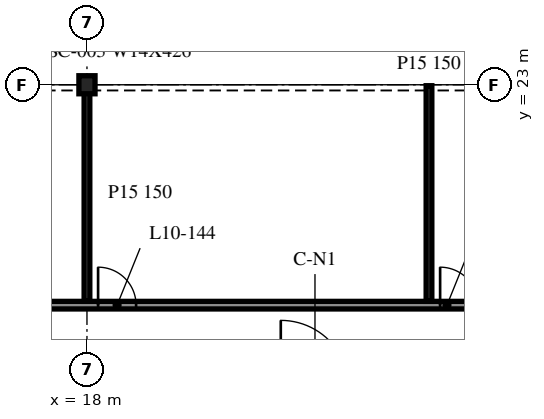
"""IFC4 building model, lengths in metres.
Left out: names, types, materials, properties, quantities, classifications, styles, units other than length and angle.
Written with IfcOpenShell. Run it as: python <this file> out.ifc"""

import sys

from ifc_helpers import new_model, si_unit, direction, frame, frame_2d, origin, origin_2d, place, context, subcontext, project, spatial, rectangle, i_section, extrude, element, fill, save


model = new_model("IFC4")
c1 = context("Model", 3, precision=1e-05, world=origin(), true_north=direction((0.0, 1.0)))
c2 = subcontext(c1, "Body", "Model", "MODEL_VIEW")
j1 = project(units=[si_unit("LENGTHUNIT", "METRE"), si_unit("PLANEANGLEUNIT", "RADIAN")], contexts=[c1])
p1 = place(None, origin())
s1 = spatial("IfcSite", under=j1, at=p1, CompositionType="ELEMENT")
p2 = place(p1, origin())
s2 = spatial("IfcBuilding", under=s1, at=p2, CompositionType="ELEMENT")
p3 = place(p2, frame((0.0, 0.0, 46.0)))
s3 = spatial("IfcBuildingStorey", under=s2, at=p3, CompositionType="ELEMENT", Elevation=46.0)
p4 = place(p3, frame((18.0, 23.0, -0.34), z_axis=(0.0, 0.0, 1.0), x_axis=(1.0, 0.0, 0.0)))
e1 = element("IfcColumn", 1, at=p4, inside=s3, PredefinedType="COLUMN", context=c2, shape_type="SweptSolid", body=[
    extrude(i_section(OverallWidth=0.424, OverallDepth=0.475, WebThickness=0.048, FlangeThickness=0.077, at=origin_2d()), origin(), (0.0, 0.0, 1.0), 4.3),
])
p5 = place(p3, frame((-41.807, 17.2, 0.0), z_axis=(0.0, 0.0, 1.0), x_axis=(1.0, 0.0, 0.0)))
e2 = element("IfcWall", 2, at=p5, inside=s3, PredefinedType="PARTITIONING", context=c2, shape_type="SweptSolid", body=[
    extrude(rectangle(XDim=95.615, YDim=0.2, at=frame_2d((47.807, 0.0))), origin(), (0.0, 0.0, 1.0), 3.96),
])
p6 = place(p5, frame((7.5, 0.0, 0.0)))
e3 = element("IfcOpeningElement", 3, at=p6, cuts=e2, PredefinedType="OPENING", context=c2, shape_type="SweptSolid", body=[
    extrude(rectangle(XDim=1.0, YDim=2.1, at=frame_2d((0.5, 1.05))), frame((0.0, 0.11, 0.0), z_axis=(0.0, -1.0, 0.0), x_axis=(1.0, 0.0, 0.0)), (0.0, 0.0, 1.0), 0.22),
])
p7 = place(p5, frame((10.9, 0.0, 0.0)))
e4 = element("IfcOpeningElement", 4, at=p7, cuts=e2, PredefinedType="OPENING", context=c2, shape_type="SweptSolid", body=[
    extrude(rectangle(XDim=1.0, YDim=2.1, at=frame_2d((0.5, 1.05))), frame((0.0, 0.11, 0.0), z_axis=(0.0, -1.0, 0.0), x_axis=(1.0, 0.0, 0.0)), (0.0, 0.0, 1.0), 0.22),
])
p8 = place(p5, frame((13.7, 0.0, 0.0)))
e5 = element("IfcOpeningElement", 5, at=p8, cuts=e2, PredefinedType="OPENING", context=c2, shape_type="SweptSolid", body=[
    extrude(rectangle(XDim=0.9, YDim=2.1, at=frame_2d((0.45, 1.05))), frame((0.0, 0.11, 0.0), z_axis=(0.0, -1.0, 0.0), x_axis=(1.0, 0.0, 0.0)), (0.0, 0.0, 1.0), 0.22),
])
p9 = place(p5, frame((22.3, 0.0, 0.0)))
e6 = element("IfcOpeningElement", 6, at=p9, cuts=e2, PredefinedType="OPENING", context=c2, shape_type="SweptSolid", body=[
    extrude(rectangle(XDim=1.2, YDim=2.1, at=frame_2d((0.6, 1.05))), frame((0.0, 0.11, 0.0), z_axis=(0.0, -1.0, 0.0), x_axis=(1.0, 0.0, 0.0)), (0.0, 0.0, 1.0), 0.22),
])
p10 = place(p5, frame((28.7, 0.0, 0.0)))
e7 = element("IfcOpeningElement", 7, at=p10, cuts=e2, PredefinedType="OPENING", context=c2, shape_type="SweptSolid", body=[
    extrude(rectangle(XDim=0.9, YDim=2.1, at=frame_2d((0.45, 1.05))), frame((0.0, 0.11, 0.0), z_axis=(0.0, -1.0, 0.0), x_axis=(1.0, 0.0, 0.0)), (0.0, 0.0, 1.0), 0.22),
])
p11 = place(p5, frame((37.5, 0.0, 0.0)))
e8 = element("IfcOpeningElement", 8, at=p11, cuts=e2, PredefinedType="OPENING", context=c2, shape_type="SweptSolid", body=[
    extrude(rectangle(XDim=1.0, YDim=2.1, at=frame_2d((0.5, 1.05))), frame((0.0, 0.11, 0.0), z_axis=(0.0, -1.0, 0.0), x_axis=(1.0, 0.0, 0.0)), (0.0, 0.0, 1.0), 0.22),
])
p12 = place(p5, frame((40.9, 0.0, 0.0)))
e9 = element("IfcOpeningElement", 9, at=p12, cuts=e2, PredefinedType="OPENING", context=c2, shape_type="SweptSolid", body=[
    extrude(rectangle(XDim=1.0, YDim=2.1, at=frame_2d((0.5, 1.05))), frame((0.0, 0.11, 0.0), z_axis=(0.0, -1.0, 0.0), x_axis=(1.0, 0.0, 0.0)), (0.0, 0.0, 1.0), 0.22),
])
p13 = place(p5, frame((43.7, 0.0, 0.0)))
e10 = element("IfcOpeningElement", 10, at=p13, cuts=e2, PredefinedType="OPENING", context=c2, shape_type="SweptSolid", body=[
    extrude(rectangle(XDim=0.9, YDim=2.1, at=frame_2d((0.45, 1.05))), frame((0.0, 0.11, 0.0), z_axis=(0.0, -1.0, 0.0), x_axis=(1.0, 0.0, 0.0)), (0.0, 0.0, 1.0), 0.22),
])
p14 = place(p5, frame((47.3, 0.0, 0.0)))
e11 = element("IfcOpeningElement", 11, at=p14, cuts=e2, PredefinedType="OPENING", context=c2, shape_type="SweptSolid", body=[
    extrude(rectangle(XDim=1.2, YDim=2.1, at=frame_2d((0.6, 1.05))), frame((0.0, 0.11, 0.0), z_axis=(0.0, -1.0, 0.0), x_axis=(1.0, 0.0, 0.0)), (0.0, 0.0, 1.0), 0.22),
])
p15 = place(p5, frame((54.1, 0.0, 0.0)))
e12 = element("IfcOpeningElement", 12, at=p15, cuts=e2, PredefinedType="OPENING", context=c2, shape_type="SweptSolid", body=[
    extrude(rectangle(XDim=0.9, YDim=2.1, at=frame_2d((0.45, 1.05))), frame((0.0, 0.11, 0.0), z_axis=(0.0, -1.0, 0.0), x_axis=(1.0, 0.0, 0.0)), (0.0, 0.0, 1.0), 0.22),
])
p16 = place(p5, frame((60.1, 0.0, 0.0)))
e13 = element("IfcOpeningElement", 13, at=p16, cuts=e2, PredefinedType="OPENING", context=c2, shape_type="SweptSolid", body=[
    extrude(rectangle(XDim=1.0, YDim=2.1, at=frame_2d((0.5, 1.05))), frame((0.0, 0.11, 0.0), z_axis=(0.0, -1.0, 0.0), x_axis=(1.0, 0.0, 0.0)), (0.0, 0.0, 1.0), 0.22),
])
p17 = place(p5, frame((69.1, 0.0, 0.0)))
e14 = element("IfcOpeningElement", 14, at=p17, cuts=e2, PredefinedType="OPENING", context=c2, shape_type="SweptSolid", body=[
    extrude(rectangle(XDim=1.0, YDim=2.1, at=frame_2d((0.5, 1.05))), frame((0.0, 0.11, 0.0), z_axis=(0.0, -1.0, 0.0), x_axis=(1.0, 0.0, 0.0)), (0.0, 0.0, 1.0), 0.22),
])
p18 = place(p5, frame((72.5, 0.0, 0.0)))
e15 = element("IfcOpeningElement", 15, at=p18, cuts=e2, PredefinedType="OPENING", context=c2, shape_type="SweptSolid", body=[
    extrude(rectangle(XDim=0.9, YDim=2.1, at=frame_2d((0.45, 1.05))), frame((0.0, 0.11, 0.0), z_axis=(0.0, -1.0, 0.0), x_axis=(1.0, 0.0, 0.0)), (0.0, 0.0, 1.0), 0.22),
])
p19 = place(p5, frame((75.1, 0.0, 0.0)))
e16 = element("IfcOpeningElement", 16, at=p19, cuts=e2, PredefinedType="OPENING", context=c2, shape_type="SweptSolid", body=[
    extrude(rectangle(XDim=1.2, YDim=2.1, at=frame_2d((0.6, 1.05))), frame((0.0, 0.11, 0.0), z_axis=(0.0, -1.0, 0.0), x_axis=(1.0, 0.0, 0.0)), (0.0, 0.0, 1.0), 0.22),
])
p20 = place(p5, frame((84.1, 0.0, 0.0)))
e17 = element("IfcOpeningElement", 17, at=p20, cuts=e2, PredefinedType="OPENING", context=c2, shape_type="SweptSolid", body=[
    extrude(rectangle(XDim=0.9, YDim=2.1, at=frame_2d((0.45, 1.05))), frame((0.0, 0.11, 0.0), z_axis=(0.0, -1.0, 0.0), x_axis=(1.0, 0.0, 0.0)), (0.0, 0.0, 1.0), 0.22),
])
p21 = place(p5, frame((90.1, 0.0, 0.0)))
e18 = element("IfcOpeningElement", 18, at=p21, cuts=e2, PredefinedType="OPENING", context=c2, shape_type="SweptSolid", body=[
    extrude(rectangle(XDim=1.0, YDim=2.1, at=frame_2d((0.5, 1.05))), frame((0.0, 0.11, 0.0), z_axis=(0.0, -1.0, 0.0), x_axis=(1.0, 0.0, 0.0)), (0.0, 0.0, 1.0), 0.22),
])
for number, where, z_axis, x_axis in (
    (19, (18.0, 17.3, 0.0), (0.0, 0.0, 1.0), (0.0, 1.0, 0.0)),
    (20, (27.0, 17.3, 0.0), (0.0, 0.0, 1.0), (0.0, 1.0, 0.0)),
):
    element("IfcWall", number, at=place(p3, frame(where, z_axis=z_axis, x_axis=x_axis)), inside=s3, PredefinedType="PARTITIONING", context=c2, shape_type="SweptSolid", body=[
        extrude(rectangle(XDim=5.675, YDim=0.15, at=frame_2d((2.837, 0.0))), origin(), (0.0, 0.0, 1.0), 3.96),
    ])
p22 = place(p16, origin())
e21 = element("IfcDoor", 21, at=p22, inside=s3, OperationType="SINGLE_SWING_RIGHT", PredefinedType="DOOR", context=c2, shape_type="SweptSolid", body=[
    extrude(rectangle(XDim=1.0, YDim=2.1, at=frame_2d((0.5, 1.05))), frame((0.0, 0.025, 0.0), z_axis=(0.0, -1.0, 0.0), x_axis=(1.0, 0.0, 0.0)), (0.0, 0.0, 1.0), 0.05),
])
fill(e13, e21)
p23 = place(p17, origin())
e22 = element("IfcDoor", 22, at=p23, inside=s3, OperationType="SINGLE_SWING_RIGHT", PredefinedType="DOOR", context=c2, shape_type="SweptSolid", body=[
    extrude(rectangle(XDim=1.0, YDim=2.1, at=frame_2d((0.5, 1.05))), frame((0.0, 0.025, 0.0), z_axis=(0.0, -1.0, 0.0), x_axis=(1.0, 0.0, 0.0)), (0.0, 0.0, 1.0), 0.05),
])
fill(e14, e22)
save(model, sys.argv[1])
